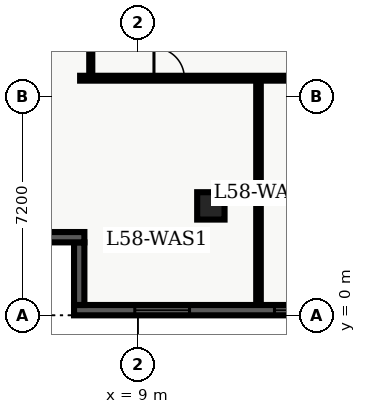
"""IFC4 building model, lengths in metres.
Left out: names, types, materials, properties, quantities, classifications, styles, units other than length and angle.
Written with IfcOpenShell. Run it as: python <this file> out.ifc"""

import sys

from ifc_helpers import new_model, entity, si_unit, converted_unit, direction, frame, origin_with_axes, origin_2d_with_axis, place, context, subcontext, project, spatial, polyline, rectangle, outline, extrude, element, fill, save


model = new_model("IFC4")
c1 = context("Model", 3, precision=1e-05, world=origin_with_axes(), true_north=direction((0.0, 1.0)))
c2 = subcontext(c1, "Body", "Model", "MODEL_VIEW")
j1 = project(units=[si_unit("LENGTHUNIT", "METRE"), converted_unit("PLANEANGLEUNIT", "DEGREE", entity("IfcPlaneAngleMeasure", 0.017), si_unit("PLANEANGLEUNIT", "RADIAN"), dimensions=[0, 0, 0, 0, 0, 0, 0])], contexts=[c1])
p1 = place(None, origin_with_axes())
s1 = spatial("IfcSite", under=j1, at=p1, CompositionType="ELEMENT")
p2 = place(p1, origin_with_axes())
s2 = spatial("IfcBuilding", under=s1, at=p2, CompositionType="ELEMENT")
p3 = place(p2, frame((0.0, 0.0, 236.4), z_axis=(0.0, 0.0, 1.0), x_axis=(1.0, 0.0, 0.0)))
s3 = spatial("IfcBuildingStorey", under=s2, at=p3, CompositionType="ELEMENT", Elevation=236.4)
p4 = place(p3, frame((11.4, 3.6, 0.0), z_axis=(0.0, 0.0, 1.0), x_axis=(1.0, 0.0, 0.0)))
e1 = element("IfcColumn", 1, at=p4, inside=s3, PredefinedType="COLUMN", context=c2, shape_type="SweptSolid", body=[
    extrude(rectangle(XDim=0.9, YDim=0.9, at=origin_2d_with_axis()), origin_with_axes(), (0.0, 0.0, 1.0), 3.9),
])
p5 = place(p3, frame((7.1, 7.8, 0.0), z_axis=(0.0, 0.0, 1.0), x_axis=(1.0, 0.0, 0.0)))
e2 = element("IfcWall", 2, at=p5, inside=s3, PredefinedType="PARTITIONING", context=c2, shape_type="SweptSolid", body=[
    extrude(outline(polyline([(0.0, -0.08), (13.2, -0.08), (13.2, 0.08), (0.0, 0.08), (0.0, -0.08)])), origin_with_axes(), (0.0, 0.0, 1.0), 2.7),
])
p6 = place(p5, frame((2.929, 0.0, 0.0), z_axis=(0.0, 0.0, 1.0), x_axis=(1.0, 0.0, 0.0)))
e3 = element("IfcOpeningElement", 3, at=p6, cuts=e2, PredefinedType="OPENING", context=c2, shape_type="SweptSolid", body=[
    extrude(rectangle(XDim=1.0, YDim=0.18, at=origin_2d_with_axis()), origin_with_axes(), (0.0, 0.0, 1.0), 2.15),
])
p7 = place(p5, frame((7.56, 0.0, 0.0), z_axis=(0.0, 0.0, 1.0), x_axis=(1.0, 0.0, 0.0)))
e4 = element("IfcOpeningElement", 4, at=p7, cuts=e2, PredefinedType="OPENING", context=c2, shape_type="SweptSolid", body=[
    extrude(rectangle(XDim=1.0, YDim=0.18, at=origin_2d_with_axis()), origin_with_axes(), (0.0, 0.0, 1.0), 2.15),
])
p8 = place(p5, frame((11.201, 0.0, 0.0), z_axis=(0.0, 0.0, 1.0), x_axis=(1.0, 0.0, 0.0)))
e5 = element("IfcOpeningElement", 5, at=p8, cuts=e2, PredefinedType="OPENING", context=c2, shape_type="SweptSolid", body=[
    extrude(rectangle(XDim=1.0, YDim=0.18, at=origin_2d_with_axis()), origin_with_axes(), (0.0, 0.0, 1.0), 2.15),
])
p9 = place(p3, frame((7.45, 7.8, 0.0), z_axis=(0.0, 0.0, 1.0), x_axis=(0.0, 1.0, 0.0)))
e6 = element("IfcWall", 6, at=p9, inside=s3, PredefinedType="PARTITIONING", context=c2, shape_type="SweptSolid", body=[
    extrude(outline(polyline([(0.0, -0.05), (32.7, -0.05), (32.7, 0.05), (0.0, 0.05), (0.0, -0.05)])), origin_with_axes(), (0.0, 0.0, 1.0), 2.7),
])
p10 = place(p9, frame((2.296, 0.0, 0.0), z_axis=(0.0, 0.0, 1.0), x_axis=(1.0, 0.0, 0.0)))
e7 = element("IfcOpeningElement", 7, at=p10, cuts=e6, PredefinedType="OPENING", context=c2, shape_type="SweptSolid", body=[
    extrude(rectangle(XDim=1.0, YDim=0.12, at=origin_2d_with_axis()), origin_with_axes(), (0.0, 0.0, 1.0), 2.15),
])
p11 = place(p9, frame((6.989, 0.0, 0.0), z_axis=(0.0, 0.0, 1.0), x_axis=(1.0, 0.0, 0.0)))
e8 = element("IfcOpeningElement", 8, at=p11, cuts=e6, PredefinedType="OPENING", context=c2, shape_type="SweptSolid", body=[
    extrude(rectangle(XDim=1.0, YDim=0.12, at=origin_2d_with_axis()), origin_with_axes(), (0.0, 0.0, 1.0), 2.15),
])
p12 = place(p9, frame((12.56, 0.0, 0.0), z_axis=(0.0, 0.0, 1.0), x_axis=(1.0, 0.0, 0.0)))
e9 = element("IfcOpeningElement", 9, at=p12, cuts=e6, PredefinedType="OPENING", context=c2, shape_type="SweptSolid", body=[
    extrude(rectangle(XDim=1.0, YDim=0.12, at=origin_2d_with_axis()), origin_with_axes(), (0.0, 0.0, 1.0), 2.15),
])
p13 = place(p9, frame((19.334, 0.0, 0.0), z_axis=(0.0, 0.0, 1.0), x_axis=(1.0, 0.0, 0.0)))
e10 = element("IfcOpeningElement", 10, at=p13, cuts=e6, PredefinedType="OPENING", context=c2, shape_type="SweptSolid", body=[
    extrude(rectangle(XDim=1.0, YDim=0.12, at=origin_2d_with_axis()), origin_with_axes(), (0.0, 0.0, 1.0), 2.15),
])
p14 = place(p9, frame((27.817, 0.0, 0.0), z_axis=(0.0, 0.0, 1.0), x_axis=(1.0, 0.0, 0.0)))
e11 = element("IfcOpeningElement", 11, at=p14, cuts=e6, PredefinedType="OPENING", context=c2, shape_type="SweptSolid", body=[
    extrude(rectangle(XDim=1.0, YDim=0.12, at=origin_2d_with_axis()), origin_with_axes(), (0.0, 0.0, 1.0), 2.15),
])
p15 = place(p3, frame((12.967, 0.335, 0.0), z_axis=(0.0, 0.0, 1.0), x_axis=(0.0, 1.0, 0.0)))
e12 = element("IfcWall", 12, at=p15, inside=s3, PredefinedType="PARTITIONING", context=c2, shape_type="SweptSolid", body=[
    extrude(outline(polyline([(0.0, -0.075), (7.365, -0.075), (7.365, 0.075), (0.0, 0.075), (0.0, -0.075)])), origin_with_axes(), (0.0, 0.0, 1.0), 2.7),
])
p16 = place(p3, frame((49.46, 0.17, 0.0), z_axis=(0.0, 0.0, 1.0), x_axis=(-1.0, 0.0, 0.0)))
e13 = element("IfcWall", 13, at=p16, inside=s3, PredefinedType="SOLIDWALL", context=c2, shape_type="SweptSolid", body=[
    extrude(outline(polyline([(0.0, -0.17), (42.56, -0.17), (42.56, 0.17), (0.0, 0.17), (0.0, -0.17)])), origin_with_axes(), (0.0, 0.0, 1.0), 3.66),
])
p17 = place(p16, frame((2.898, 0.0, 0.45), z_axis=(0.0, 0.0, 1.0), x_axis=(1.0, 0.0, 0.0)))
e14 = element("IfcOpeningElement", 14, at=p17, cuts=e13, PredefinedType="OPENING", context=c2, shape_type="SweptSolid", body=[
    extrude(rectangle(XDim=1.8, YDim=0.36, at=origin_2d_with_axis()), origin_with_axes(), (0.0, 0.0, 1.0), 2.1),
])
p18 = place(p16, frame((7.493, 0.0, 0.45), z_axis=(0.0, 0.0, 1.0), x_axis=(1.0, 0.0, 0.0)))
e15 = element("IfcOpeningElement", 15, at=p18, cuts=e13, PredefinedType="OPENING", context=c2, shape_type="SweptSolid", body=[
    extrude(rectangle(XDim=1.8, YDim=0.36, at=origin_2d_with_axis()), origin_with_axes(), (0.0, 0.0, 1.0), 2.1),
])
p19 = place(p16, frame((12.089, 0.0, 0.45), z_axis=(0.0, 0.0, 1.0), x_axis=(1.0, 0.0, 0.0)))
e16 = element("IfcOpeningElement", 16, at=p19, cuts=e13, PredefinedType="OPENING", context=c2, shape_type="SweptSolid", body=[
    extrude(rectangle(XDim=1.8, YDim=0.36, at=origin_2d_with_axis()), origin_with_axes(), (0.0, 0.0, 1.0), 2.1),
])
p20 = place(p16, frame((16.234, 0.0, 0.45), z_axis=(0.0, 0.0, 1.0), x_axis=(1.0, 0.0, 0.0)))
e17 = element("IfcOpeningElement", 17, at=p20, cuts=e13, PredefinedType="OPENING", context=c2, shape_type="SweptSolid", body=[
    extrude(rectangle(XDim=1.8, YDim=0.36, at=origin_2d_with_axis()), origin_with_axes(), (0.0, 0.0, 1.0), 2.1),
])
p21 = place(p16, frame((25.876, 0.0, 0.45), z_axis=(0.0, 0.0, 1.0), x_axis=(1.0, 0.0, 0.0)))
e18 = element("IfcOpeningElement", 18, at=p21, cuts=e13, PredefinedType="OPENING", context=c2, shape_type="SweptSolid", body=[
    extrude(rectangle(XDim=1.8, YDim=0.36, at=origin_2d_with_axis()), origin_with_axes(), (0.0, 0.0, 1.0), 2.1),
])
p22 = place(p16, frame((30.471, 0.0, 0.45), z_axis=(0.0, 0.0, 1.0), x_axis=(1.0, 0.0, 0.0)))
e19 = element("IfcOpeningElement", 19, at=p22, cuts=e13, PredefinedType="OPENING", context=c2, shape_type="SweptSolid", body=[
    extrude(rectangle(XDim=1.8, YDim=0.36, at=origin_2d_with_axis()), origin_with_axes(), (0.0, 0.0, 1.0), 2.1),
])
p23 = place(p16, frame((35.067, 0.0, 0.45), z_axis=(0.0, 0.0, 1.0), x_axis=(1.0, 0.0, 0.0)))
e20 = element("IfcOpeningElement", 20, at=p23, cuts=e13, PredefinedType="OPENING", context=c2, shape_type="SweptSolid", body=[
    extrude(rectangle(XDim=1.8, YDim=0.36, at=origin_2d_with_axis()), origin_with_axes(), (0.0, 0.0, 1.0), 2.1),
])
p24 = place(p16, frame((39.662, 0.0, 0.45), z_axis=(0.0, 0.0, 1.0), x_axis=(1.0, 0.0, 0.0)))
e21 = element("IfcOpeningElement", 21, at=p24, cuts=e13, PredefinedType="OPENING", context=c2, shape_type="SweptSolid", body=[
    extrude(rectangle(XDim=1.8, YDim=0.36, at=origin_2d_with_axis()), origin_with_axes(), (0.0, 0.0, 1.0), 2.1),
])
p25 = place(p3, frame((7.07, 0.34, 0.0), z_axis=(0.0, 0.0, 1.0), x_axis=(0.0, 1.0, 0.0)))
e22 = element("IfcWall", 22, at=p25, inside=s3, PredefinedType="SOLIDWALL", context=c2, shape_type="SweptSolid", body=[
    extrude(outline(polyline([(0.0, -0.17), (2.06, -0.17), (2.06, 0.17), (0.0, 0.17), (0.0, -0.17)])), origin_with_axes(), (0.0, 0.0, 1.0), 3.66),
])
p26 = place(p3, frame((7.24, 2.57, 0.0), z_axis=(0.0, 0.0, 1.0), x_axis=(-1.0, 0.0, 0.0)))
e23 = element("IfcWall", 23, at=p26, inside=s3, PredefinedType="SOLIDWALL", context=c2, shape_type="SweptSolid", body=[
    extrude(outline(polyline([(0.0, -0.17), (2.74, -0.17), (2.74, 0.17), (0.0, 0.17), (0.0, -0.17)])), origin_with_axes(), (0.0, 0.0, 1.0), 3.66),
])
p27 = place(p5, frame((2.929, 0.0, 0.0), z_axis=(0.0, 0.0, 1.0), x_axis=(1.0, 0.0, 0.0)))
e24 = element("IfcDoor", 24, at=p27, inside=s3, OperationType="SINGLE_SWING_LEFT", PredefinedType="DOOR", context=c2, shape_type="SweptSolid", body=[
    extrude(rectangle(XDim=1.0, YDim=0.09, at=origin_2d_with_axis()), origin_with_axes(), (0.0, 0.0, 1.0), 2.15),
])
fill(e3, e24)
p28 = place(p16, frame((35.067, 0.0, 0.45), z_axis=(0.0, 0.0, 1.0), x_axis=(1.0, 0.0, 0.0)))
e25 = element("IfcWindow", 25, at=p28, inside=s3, PredefinedType="WINDOW", context=c2, shape_type="SweptSolid", body=[
    extrude(rectangle(XDim=1.8, YDim=0.09, at=origin_2d_with_axis()), origin_with_axes(), (0.0, 0.0, 1.0), 2.1),
])
fill(e20, e25)
p29 = place(p16, frame((39.662, 0.0, 0.45), z_axis=(0.0, 0.0, 1.0), x_axis=(1.0, 0.0, 0.0)))
e26 = element("IfcWindow", 26, at=p29, inside=s3, PredefinedType="WINDOW", context=c2, shape_type="SweptSolid", body=[
    extrude(rectangle(XDim=1.8, YDim=0.09, at=origin_2d_with_axis()), origin_with_axes(), (0.0, 0.0, 1.0), 2.1),
])
fill(e21, e26)
save(model, sys.argv[1])
